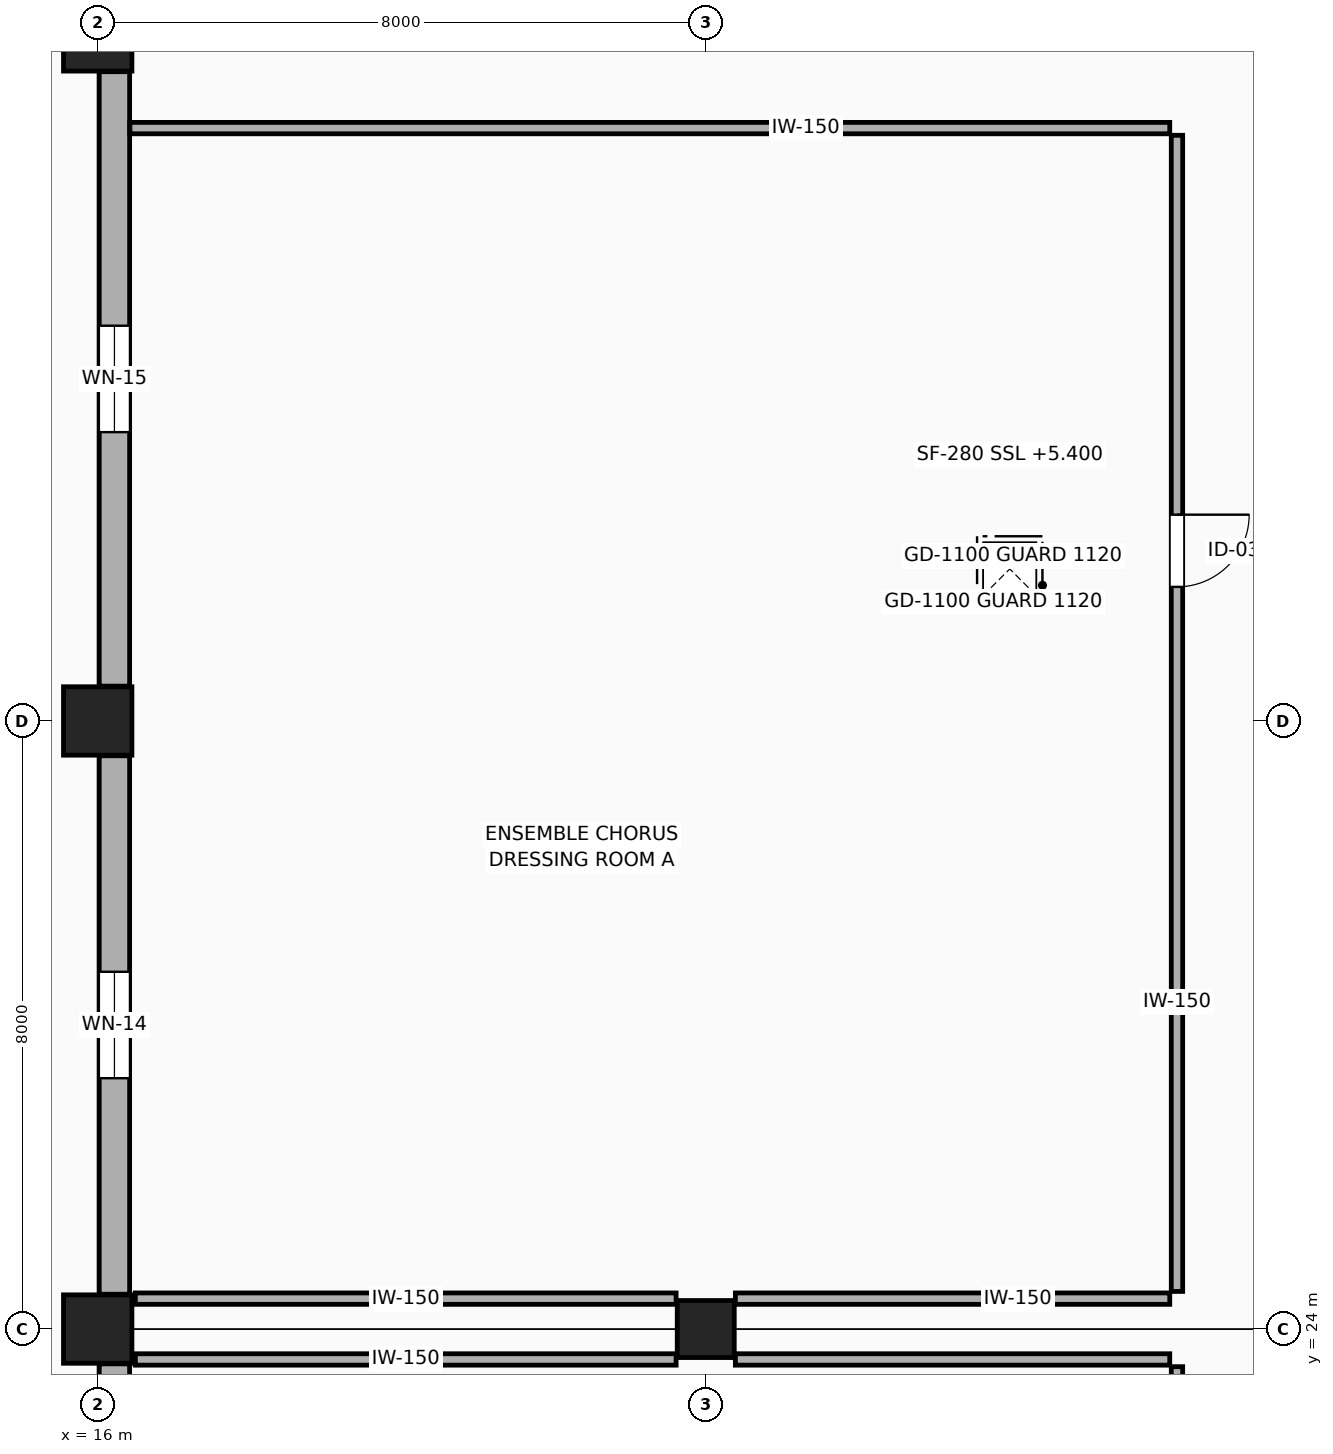
"""IFC4 building model, lengths in metres.
Left out: names, types, materials, properties, quantities, classifications, styles, units other than length and angle.
Written with IfcOpenShell. Run it as: python <this file> out.ifc"""

import sys

from ifc_helpers import new_model, si_unit, direction, frame, frame_2d, origin, origin_2d, place, context, subcontext, project, spatial, rectangle, extrude, element, fill, save


model = new_model("IFC4")
c1 = context("Model", 3, precision=1e-05, world=origin(), true_north=direction((0.0, 1.0)))
c2 = subcontext(c1, "Body", "Model", "MODEL_VIEW")
j1 = project(units=[si_unit("LENGTHUNIT", "METRE"), si_unit("PLANEANGLEUNIT", "RADIAN")], contexts=[c1])
p1 = place(None, origin())
s1 = spatial("IfcSite", under=j1, at=p1, CompositionType="ELEMENT")
p2 = place(p1, origin())
s2 = spatial("IfcBuilding", under=s1, at=p2, CompositionType="ELEMENT")
p3 = place(p2, frame((0.0, 0.0, 5.4)))
s3 = spatial("IfcBuildingStorey", under=s2, at=p3, CompositionType="ELEMENT", Elevation=5.4)
for number, where, z_axis, x_axis in (
    (1, (16.0, 24.0, 0.0), (0.0, 0.0, 1.0), (1.0, 0.0, 0.0)),
    (2, (16.0, 32.0, 0.0), (0.0, 0.0, 1.0), (1.0, 0.0, 0.0)),
    (3, (16.0, 41.0, 0.0), (0.0, 0.0, 1.0), (1.0, 0.0, 0.0)),
):
    element("IfcColumn", number, at=place(p3, frame(where, z_axis=z_axis, x_axis=x_axis)), inside=s3, PredefinedType="COLUMN", context=c2, shape_type="SweptSolid", body=[
        extrude(rectangle(XDim=0.9, YDim=0.9, at=origin_2d()), origin(), (0.0, 0.0, 1.0), 4.8),
    ])
p4 = place(p3, frame((24.0, 24.0, 0.0), z_axis=(0.0, 0.0, 1.0), x_axis=(1.0, 0.0, 0.0)))
e4 = element("IfcColumn", 4, at=p4, inside=s3, PredefinedType="COLUMN", context=c2, shape_type="SweptSolid", body=[
    extrude(rectangle(XDim=0.75, YDim=0.75, at=origin_2d()), origin(), (0.0, 0.0, 1.0), 4.8),
])
p5 = place(p3, frame((16.22, 21.204, 0.0), z_axis=(0.0, 0.0, 1.0), x_axis=(0.0, 1.0, 0.0)))
e5 = element("IfcWall", 5, at=p5, inside=s3, PredefinedType="STANDARD", context=c2, shape_type="SweptSolid", body=[
    extrude(rectangle(XDim=2.338, YDim=0.4, at=frame_2d((1.169, 0.0))), origin(), (0.0, 0.0, 1.0), 4.54),
])
p6 = place(p3, frame((16.22, 24.458, 0.0), z_axis=(0.0, 0.0, 1.0), x_axis=(0.0, 1.0, 0.0)))
e6 = element("IfcWall", 6, at=p6, inside=s3, PredefinedType="STANDARD", context=c2, shape_type="SweptSolid", body=[
    extrude(rectangle(XDim=7.084, YDim=0.4, at=frame_2d((3.542, 0.0))), origin(), (0.0, 0.0, 1.0), 3.975),
])
p7 = place(p6, frame((2.842, 0.0, 0.95)))
e7 = element("IfcOpeningElement", 7, at=p7, cuts=e6, PredefinedType="OPENING", context=c2, shape_type="SweptSolid", body=[
    extrude(rectangle(XDim=1.4, YDim=1.5, at=frame_2d((0.7, 0.75))), frame((0.0, 0.21, 0.0), z_axis=(0.0, -1.0, 0.0), x_axis=(1.0, 0.0, 0.0)), (0.0, 0.0, 1.0), 0.42),
])
p8 = place(p3, frame((16.22, 32.458, 0.0), z_axis=(0.0, 0.0, 1.0), x_axis=(0.0, 1.0, 0.0)))
e8 = element("IfcWall", 8, at=p8, inside=s3, PredefinedType="STANDARD", context=c2, shape_type="SweptSolid", body=[
    extrude(rectangle(XDim=8.084, YDim=0.4, at=frame_2d((4.042, 0.0))), origin(), (0.0, 0.0, 1.0), 4.025),
])
p9 = place(p8, frame((3.342, 0.0, 0.95)))
e9 = element("IfcOpeningElement", 9, at=p9, cuts=e8, PredefinedType="OPENING", context=c2, shape_type="SweptSolid", body=[
    extrude(rectangle(XDim=1.4, YDim=1.8, at=frame_2d((0.7, 0.9))), frame((0.0, 0.21, 0.0), z_axis=(0.0, -1.0, 0.0), x_axis=(1.0, 0.0, 0.0)), (0.0, 0.0, 1.0), 0.42),
])
p10 = place(p3, frame((16.424, 39.8, 0.0), z_axis=(0.0, 0.0, 1.0), x_axis=(1.0, 0.0, 0.0)))
e10 = element("IfcWall", 10, at=p10, inside=s3, PredefinedType="PARTITIONING", context=c2, shape_type="SweptSolid", body=[
    extrude(rectangle(XDim=13.681, YDim=0.15, at=frame_2d((6.84, 0.0))), origin(), (0.0, 0.0, 1.0), 4.53),
])
p11 = place(p3, frame((30.2, 39.705, 0.0), z_axis=(0.0, 0.0, 1.0), x_axis=(0.0, -1.0, 0.0)))
e11 = element("IfcWall", 11, at=p11, inside=s3, PredefinedType="PARTITIONING", context=c2, shape_type="SweptSolid", body=[
    extrude(rectangle(XDim=15.21, YDim=0.15, at=frame_2d((7.605, 0.0))), origin(), (0.0, 0.0, 1.0), 4.53),
])
p12 = place(p11, frame((4.991, 0.0, 0.0)))
e12 = element("IfcOpeningElement", 12, at=p12, cuts=e11, PredefinedType="OPENING", context=c2, shape_type="SweptSolid", body=[
    extrude(rectangle(XDim=0.95, YDim=2.15, at=frame_2d((0.475, 1.075))), frame((0.0, 0.085, 0.0), z_axis=(0.0, -1.0, 0.0), x_axis=(1.0, 0.0, 0.0)), (0.0, 0.0, 1.0), 0.17),
])
p13 = place(p3, frame((30.105, 24.4, 0.0), z_axis=(0.0, 0.0, 1.0), x_axis=(-1.0, 0.0, 0.0)))
e13 = element("IfcWall", 13, at=p13, inside=s3, PredefinedType="PARTITIONING", context=c2, shape_type="SweptSolid", body=[
    extrude(rectangle(XDim=5.715, YDim=0.15, at=frame_2d((2.857, 0.0))), origin(), (0.0, 0.0, 1.0), 3.77),
])
p14 = place(p3, frame((23.61, 24.4, 0.0), z_axis=(0.0, 0.0, 1.0), x_axis=(-1.0, 0.0, 0.0)))
e14 = element("IfcWall", 14, at=p14, inside=s3, PredefinedType="PARTITIONING", context=c2, shape_type="SweptSolid", body=[
    extrude(rectangle(XDim=7.115, YDim=0.15, at=frame_2d((3.558, 0.0))), origin(), (0.0, 0.0, 1.0), 3.67),
])
p15 = place(p3, frame((30.2, 23.505, 0.0), z_axis=(0.0, 0.0, 1.0), x_axis=(0.0, -1.0, 0.0)))
e15 = element("IfcWall", 15, at=p15, inside=s3, PredefinedType="PARTITIONING", context=c2, shape_type="SweptSolid", body=[
    extrude(rectangle(XDim=15.241, YDim=0.15, at=frame_2d((7.621, 0.0))), origin(), (0.0, 0.0, 1.0), 4.53),
])
p16 = place(p15, frame((12.006, 0.0, 0.0)))
e16 = element("IfcOpeningElement", 16, at=p16, cuts=e15, PredefinedType="OPENING", context=c2, shape_type="SweptSolid", body=[
    extrude(rectangle(XDim=1.05, YDim=2.15, at=frame_2d((0.525, 1.075))), frame((0.0, 0.085, 0.0), z_axis=(0.0, -1.0, 0.0), x_axis=(1.0, 0.0, 0.0)), (0.0, 0.0, 1.0), 0.17),
])
p17 = place(p3, frame((16.495, 23.6, 0.0), z_axis=(0.0, 0.0, 1.0), x_axis=(1.0, 0.0, 0.0)))
e17 = element("IfcWall", 17, at=p17, inside=s3, PredefinedType="PARTITIONING", context=c2, shape_type="SweptSolid", body=[
    extrude(rectangle(XDim=7.115, YDim=0.15, at=frame_2d((3.558, 0.0))), origin(), (0.0, 0.0, 1.0), 3.67),
])
p18 = place(p3, frame((24.39, 23.6, 0.0), z_axis=(0.0, 0.0, 1.0), x_axis=(1.0, 0.0, 0.0)))
e18 = element("IfcWall", 18, at=p18, inside=s3, PredefinedType="PARTITIONING", context=c2, shape_type="SweptSolid", body=[
    extrude(rectangle(XDim=5.715, YDim=0.15, at=frame_2d((2.857, 0.0))), origin(), (0.0, 0.0, 1.0), 3.77),
])
p19 = place(p7, origin())
e19 = element("IfcWindow", 19, at=p19, inside=s3, PartitioningType="SINGLE_PANEL", PredefinedType="WINDOW", context=c2, shape_type="SweptSolid", body=[
    extrude(rectangle(XDim=1.4, YDim=1.5, at=frame_2d((0.7, 0.75))), frame((0.0, 0.03, 0.0), z_axis=(0.0, -1.0, 0.0), x_axis=(1.0, 0.0, 0.0)), (0.0, 0.0, 1.0), 0.06),
])
fill(e7, e19)
p20 = place(p9, origin())
e20 = element("IfcWindow", 20, at=p20, inside=s3, PartitioningType="SINGLE_PANEL", PredefinedType="WINDOW", context=c2, shape_type="SweptSolid", body=[
    extrude(rectangle(XDim=1.4, YDim=1.8, at=frame_2d((0.7, 0.9))), frame((0.0, 0.03, 0.0), z_axis=(0.0, -1.0, 0.0), x_axis=(1.0, 0.0, 0.0)), (0.0, 0.0, 1.0), 0.06),
])
fill(e9, e20)
p21 = place(p12, origin())
e21 = element("IfcDoor", 21, at=p21, inside=s3, OperationType="SINGLE_SWING_LEFT", PredefinedType="DOOR", context=c2, shape_type="SweptSolid", body=[
    extrude(rectangle(XDim=0.95, YDim=2.15, at=frame_2d((0.475, 1.075))), frame((0.0, 0.025, 0.0), z_axis=(0.0, -1.0, 0.0), x_axis=(1.0, 0.0, 0.0)), (0.0, 0.0, 1.0), 0.05),
])
fill(e12, e21)
save(model, sys.argv[1])
